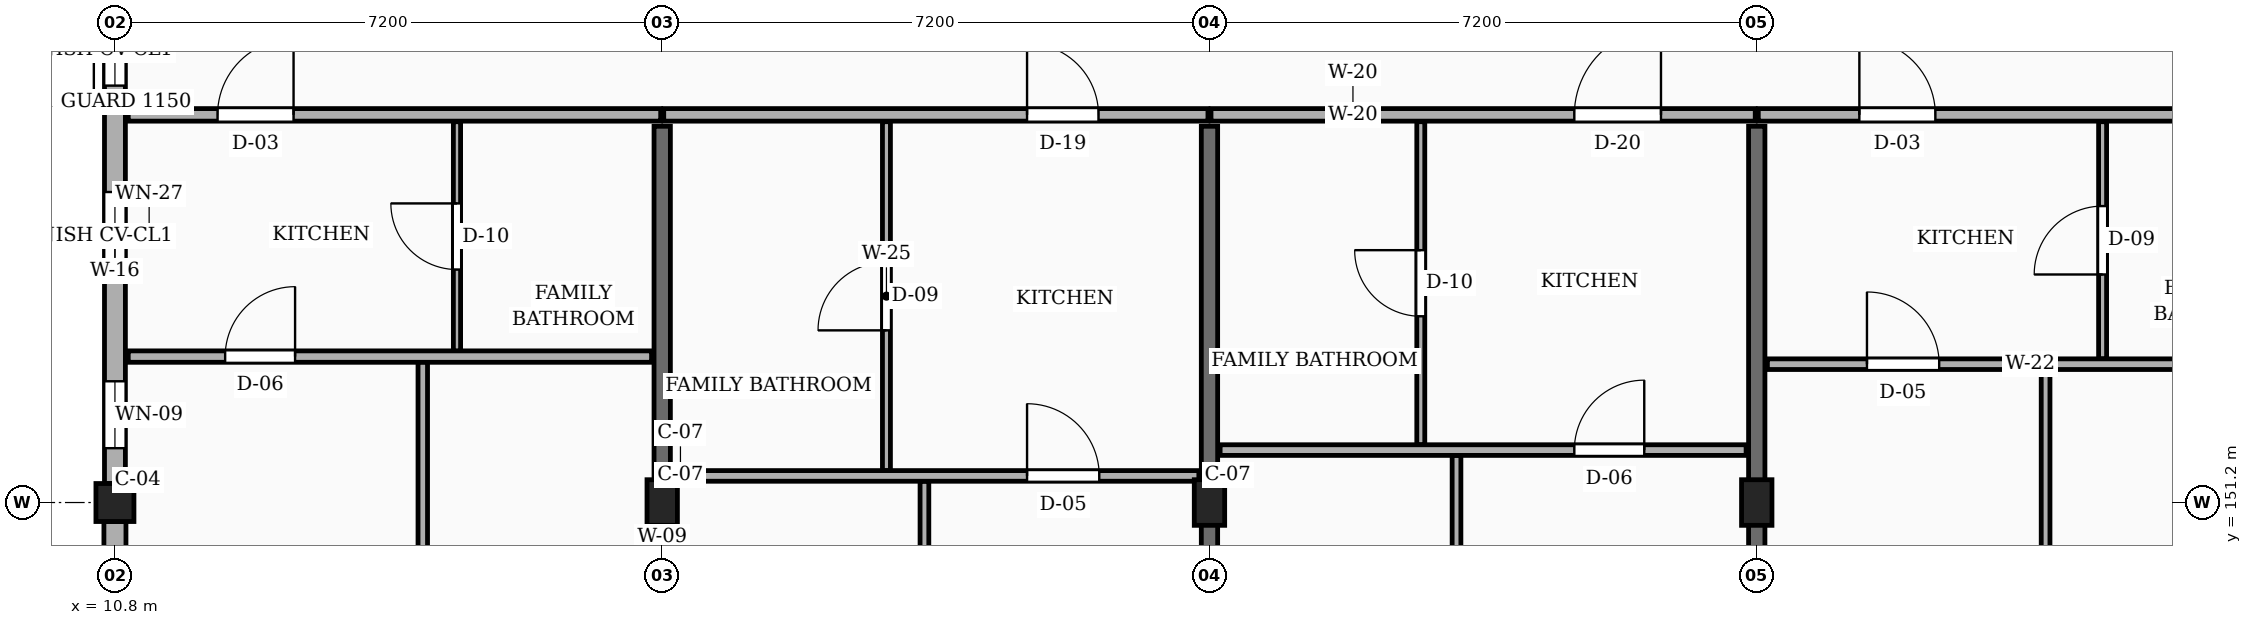
"""IFC4 building model, lengths in metres.
Left out: names, types, materials, properties, quantities, classifications, styles, units other than length and angle.
Written with IfcOpenShell. Run it as: python <this file> out.ifc"""

import sys

from ifc_helpers import new_model, si_unit, direction, frame, frame_2d, origin, origin_2d, place, context, subcontext, project, spatial, rectangle, extrude, element, fill, save


model = new_model("IFC4")
c1 = context("Model", 3, precision=1e-05, world=origin(), true_north=direction((0.0, 1.0)))
c2 = subcontext(c1, "Body", "Model", "MODEL_VIEW")
j1 = project(units=[si_unit("LENGTHUNIT", "METRE"), si_unit("PLANEANGLEUNIT", "RADIAN")], contexts=[c1])
p1 = place(None, origin())
s1 = spatial("IfcSite", under=j1, at=p1, CompositionType="ELEMENT")
p2 = place(p1, origin())
s2 = spatial("IfcBuilding", under=s1, at=p2, CompositionType="ELEMENT")
p3 = place(p2, frame((0.0, 0.0, 32.85)))
s3 = spatial("IfcBuildingStorey", under=s2, at=p3, CompositionType="ELEMENT", Elevation=32.85)
p4 = place(p3, frame((10.8, 151.2, 0.0), z_axis=(0.0, 0.0, 1.0), x_axis=(1.0, 0.0, 0.0)))
e1 = element("IfcColumn", 1, at=p4, inside=s3, PredefinedType="COLUMN", context=c2, shape_type="SweptSolid", body=[
    extrude(rectangle(XDim=0.5, YDim=0.5, at=origin_2d()), origin(), (0.0, 0.0, 1.0), 3.15),
])
for number, where, z_axis, x_axis in (
    (2, (18.0, 151.2, 0.0), (0.0, 0.0, 1.0), (1.0, 0.0, 0.0)),
    (3, (25.2, 151.2, 0.0), (0.0, 0.0, 1.0), (1.0, 0.0, 0.0)),
    (4, (32.4, 151.2, 0.0), (0.0, 0.0, 1.0), (1.0, 0.0, 0.0)),
):
    element("IfcColumn", number, at=place(p3, frame(where, z_axis=z_axis, x_axis=x_axis)), inside=s3, PredefinedType="COLUMN", context=c2, shape_type="SweptSolid", body=[
        extrude(rectangle(XDim=0.4, YDim=0.6, at=origin_2d()), origin(), (0.0, 0.0, 1.0), 3.15),
    ])
for number, where, z_axis, x_axis in (
    (5, (18.0, 144.25, 0.0), (0.0, 0.0, 1.0), (0.0, 1.0, 0.0)),
    (6, (25.2, 144.25, 0.0), (0.0, 0.0, 1.0), (0.0, 1.0, 0.0)),
    (7, (32.4, 144.25, 0.0), (0.0, 0.0, 1.0), (0.0, 1.0, 0.0)),
):
    element("IfcWall", number, at=place(p3, frame(where, z_axis=z_axis, x_axis=x_axis)), inside=s3, PredefinedType="SOLIDWALL", context=c2, shape_type="SweptSolid", body=[
        extrude(rectangle(XDim=11.9, YDim=0.215, at=frame_2d((5.95, 0.0))), origin(), (0.0, 0.0, 1.0), 2.185),
    ])
p5 = place(p3, frame((10.8, 158.15, 0.0), z_axis=(0.0, 0.0, 1.0), x_axis=(0.0, -1.0, 0.0)))
e8 = element("IfcWall", 8, at=p5, inside=s3, PredefinedType="SOLIDWALL", context=c2, shape_type="SweptSolid", body=[
    extrude(rectangle(XDim=6.7, YDim=0.275, at=frame_2d((3.35, 0.0))), origin(), (0.0, 0.0, 1.0), 2.455),
])
p6 = place(p5, frame((0.525, 0.0, 0.78)))
e9 = element("IfcOpeningElement", 9, at=p6, cuts=e8, PredefinedType="OPENING", context=c2, shape_type="SweptSolid", body=[
    extrude(rectangle(XDim=0.94, YDim=1.44, at=frame_2d((0.47, 0.72))), frame((0.0, 0.147, 0.0), z_axis=(0.0, -1.0, 0.0), x_axis=(1.0, 0.0, 0.0)), (0.0, 0.0, 1.0), 0.295),
])
p7 = place(p5, frame((2.865, 0.0, 0.78)))
e10 = element("IfcOpeningElement", 10, at=p7, cuts=e8, PredefinedType="OPENING", context=c2, shape_type="SweptSolid", body=[
    extrude(rectangle(XDim=1.15, YDim=1.44, at=frame_2d((0.575, 0.72))), frame((0.0, 0.147, 0.0), z_axis=(0.0, -1.0, 0.0), x_axis=(1.0, 0.0, 0.0)), (0.0, 0.0, 1.0), 0.295),
])
p8 = place(p5, frame((5.355, 0.0, 0.78)))
e11 = element("IfcOpeningElement", 11, at=p8, cuts=e8, PredefinedType="OPENING", context=c2, shape_type="SweptSolid", body=[
    extrude(rectangle(XDim=0.88, YDim=1.26, at=frame_2d((0.44, 0.63))), frame((0.0, 0.147, 0.0), z_axis=(0.0, -1.0, 0.0), x_axis=(1.0, 0.0, 0.0)), (0.0, 0.0, 1.0), 0.295),
])
p9 = place(p3, frame((10.8, 150.95, 0.0), z_axis=(0.0, 0.0, 1.0), x_axis=(0.0, -1.0, 0.0)))
e12 = element("IfcWall", 12, at=p9, inside=s3, PredefinedType="SOLIDWALL", context=c2, shape_type="SweptSolid", body=[
    extrude(rectangle(XDim=6.7, YDim=0.29, at=frame_2d((3.35, 0.0))), origin(), (0.0, 0.0, 1.0), 2.455),
])
p10 = place(p9, frame((0.45, 0.0, 0.78)))
e13 = element("IfcOpeningElement", 13, at=p10, cuts=e12, PredefinedType="OPENING", context=c2, shape_type="SweptSolid", body=[
    extrude(rectangle(XDim=1.25, YDim=1.44, at=frame_2d((0.625, 0.72))), frame((0.0, 0.155, 0.0), z_axis=(0.0, -1.0, 0.0), x_axis=(1.0, 0.0, 0.0)), (0.0, 0.0, 1.0), 0.31),
])
p11 = place(p9, frame((4.65, 0.0, 0.78)))
e14 = element("IfcOpeningElement", 14, at=p11, cuts=e12, PredefinedType="OPENING", context=c2, shape_type="SweptSolid", body=[
    extrude(rectangle(XDim=1.45, YDim=1.44, at=frame_2d((0.725, 0.72))), frame((0.0, 0.155, 0.0), z_axis=(0.0, -1.0, 0.0), x_axis=(1.0, 0.0, 0.0)), (0.0, 0.0, 1.0), 0.31),
])
p12 = place(p3, frame((10.975, 156.3, 0.0), z_axis=(0.0, 0.0, 1.0), x_axis=(1.0, 0.0, 0.0)))
e15 = element("IfcWall", 15, at=p12, inside=s3, PredefinedType="PARTITIONING", context=c2, shape_type="SweptSolid", body=[
    extrude(rectangle(XDim=7.005, YDim=0.165, at=frame_2d((3.502, 0.0))), origin(), (0.0, 0.0, 1.0), 2.32),
])
p13 = place(p12, frame((1.175, 0.0, 0.0)))
e16 = element("IfcOpeningElement", 16, at=p13, cuts=e15, PredefinedType="OPENING", context=c2, shape_type="SweptSolid", body=[
    extrude(rectangle(XDim=1.0, YDim=2.15, at=frame_2d((0.5, 1.075))), frame((0.0, 0.093, 0.0), z_axis=(0.0, -1.0, 0.0), x_axis=(1.0, 0.0, 0.0)), (0.0, 0.0, 1.0), 0.185),
])
p14 = place(p3, frame((18.02, 156.3, 0.0), z_axis=(0.0, 0.0, 1.0), x_axis=(1.0, 0.0, 0.0)))
e17 = element("IfcWall", 17, at=p14, inside=s3, PredefinedType="PARTITIONING", context=c2, shape_type="SweptSolid", body=[
    extrude(rectangle(XDim=7.16, YDim=0.165, at=frame_2d((3.58, 0.0))), origin(), (0.0, 0.0, 1.0), 2.32),
])
p15 = place(p14, frame((4.78, 0.0, 0.0)))
e18 = element("IfcOpeningElement", 18, at=p15, cuts=e17, PredefinedType="OPENING", context=c2, shape_type="SweptSolid", body=[
    extrude(rectangle(XDim=0.94, YDim=2.12, at=frame_2d((0.47, 1.06))), frame((0.0, 0.093, 0.0), z_axis=(0.0, -1.0, 0.0), x_axis=(1.0, 0.0, 0.0)), (0.0, 0.0, 1.0), 0.185),
])
p16 = place(p3, frame((25.22, 156.3, 0.0), z_axis=(0.0, 0.0, 1.0), x_axis=(1.0, 0.0, 0.0)))
e19 = element("IfcWall", 19, at=p16, inside=s3, PredefinedType="PARTITIONING", context=c2, shape_type="SweptSolid", body=[
    extrude(rectangle(XDim=7.16, YDim=0.165, at=frame_2d((3.58, 0.0))), origin(), (0.0, 0.0, 1.0), 2.32),
])
p17 = place(p16, frame((4.78, 0.0, 0.0)))
e20 = element("IfcOpeningElement", 20, at=p17, cuts=e19, PredefinedType="OPENING", context=c2, shape_type="SweptSolid", body=[
    extrude(rectangle(XDim=1.14, YDim=2.18, at=frame_2d((0.57, 1.09))), frame((0.0, 0.093, 0.0), z_axis=(0.0, -1.0, 0.0), x_axis=(1.0, 0.0, 0.0)), (0.0, 0.0, 1.0), 0.185),
])
p18 = place(p3, frame((32.42, 156.3, 0.0), z_axis=(0.0, 0.0, 1.0), x_axis=(1.0, 0.0, 0.0)))
e21 = element("IfcWall", 21, at=p18, inside=s3, PredefinedType="PARTITIONING", context=c2, shape_type="SweptSolid", body=[
    extrude(rectangle(XDim=7.16, YDim=0.165, at=frame_2d((3.58, 0.0))), origin(), (0.0, 0.0, 1.0), 2.32),
])
p19 = place(p18, frame((1.33, 0.0, 0.0)))
e22 = element("IfcOpeningElement", 22, at=p19, cuts=e21, PredefinedType="OPENING", context=c2, shape_type="SweptSolid", body=[
    extrude(rectangle(XDim=1.0, YDim=2.15, at=frame_2d((0.5, 1.075))), frame((0.0, 0.093, 0.0), z_axis=(0.0, -1.0, 0.0), x_axis=(1.0, 0.0, 0.0)), (0.0, 0.0, 1.0), 0.185),
])
p20 = place(p3, frame((14.85, 144.175, 0.0), z_axis=(0.0, 0.0, 1.0), x_axis=(0.0, 1.0, 0.0)))
e23 = element("IfcWall", 23, at=p20, inside=s3, PredefinedType="PARTITIONING", context=c2, shape_type="SweptSolid", body=[
    extrude(rectangle(XDim=8.875, YDim=0.125, at=frame_2d((4.438, 0.0))), origin(), (0.0, 0.0, 1.0), 2.32),
])
p21 = place(p20, frame((3.998, 0.0, 0.0)))
e24 = element("IfcOpeningElement", 24, at=p21, cuts=e23, PredefinedType="OPENING", context=c2, shape_type="SweptSolid", body=[
    extrude(rectangle(XDim=0.88, YDim=2.08, at=frame_2d((0.44, 1.04))), frame((0.0, 0.073, 0.0), z_axis=(0.0, -1.0, 0.0), x_axis=(1.0, 0.0, 0.0)), (0.0, 0.0, 1.0), 0.145),
])
p22 = place(p3, frame((15.3, 153.19, 0.0), z_axis=(0.0, 0.0, 1.0), x_axis=(0.0, 1.0, 0.0)))
e25 = element("IfcWall", 25, at=p22, inside=s3, PredefinedType="PARTITIONING", context=c2, shape_type="SweptSolid", body=[
    extrude(rectangle(XDim=3.02, YDim=0.095, at=frame_2d((1.51, 0.0))), origin(), (0.0, 0.0, 1.0), 2.32),
])
p23 = place(p22, frame((1.075, 0.0, 0.0)))
e26 = element("IfcOpeningElement", 26, at=p23, cuts=e25, PredefinedType="OPENING", context=c2, shape_type="SweptSolid", body=[
    extrude(rectangle(XDim=0.87, YDim=2.05, at=frame_2d((0.435, 1.025))), frame((0.0, 0.058, 0.0), z_axis=(0.0, -1.0, 0.0), x_axis=(1.0, 0.0, 0.0)), (0.0, 0.0, 1.0), 0.115),
])
p24 = place(p3, frame((10.975, 153.12, 0.0), z_axis=(0.0, 0.0, 1.0), x_axis=(1.0, 0.0, 0.0)))
e27 = element("IfcWall", 27, at=p24, inside=s3, PredefinedType="PARTITIONING", context=c2, shape_type="SweptSolid", body=[
    extrude(rectangle(XDim=6.885, YDim=0.15, at=frame_2d((3.442, 0.0))), origin(), (0.0, 0.0, 1.0), 2.32),
])
p25 = place(p24, frame((1.275, 0.0, 0.0)))
e28 = element("IfcOpeningElement", 28, at=p25, cuts=e27, PredefinedType="OPENING", context=c2, shape_type="SweptSolid", body=[
    extrude(rectangle(XDim=0.92, YDim=2.1, at=frame_2d((0.46, 1.05))), frame((0.0, 0.085, 0.0), z_axis=(0.0, -1.0, 0.0), x_axis=(1.0, 0.0, 0.0)), (0.0, 0.0, 1.0), 0.17),
])
p26 = place(p3, frame((21.45, 144.175, 0.0), z_axis=(0.0, 0.0, 1.0), x_axis=(0.0, 1.0, 0.0)))
e29 = element("IfcWall", 29, at=p26, inside=s3, PredefinedType="PARTITIONING", context=c2, shape_type="SweptSolid", body=[
    extrude(rectangle(XDim=7.305, YDim=0.115, at=frame_2d((3.652, 0.0))), origin(), (0.0, 0.0, 1.0), 2.32),
])
p27 = place(p26, frame((3.202, 0.0, 0.0)))
e30 = element("IfcOpeningElement", 30, at=p27, cuts=e29, PredefinedType="OPENING", context=c2, shape_type="SweptSolid", body=[
    extrude(rectangle(XDim=0.9, YDim=2.1, at=frame_2d((0.45, 1.05))), frame((0.0, 0.067, 0.0), z_axis=(0.0, -1.0, 0.0), x_axis=(1.0, 0.0, 0.0)), (0.0, 0.0, 1.0), 0.135),
])
p28 = place(p3, frame((20.95, 151.62, 0.0), z_axis=(0.0, 0.0, 1.0), x_axis=(0.0, 1.0, 0.0)))
e31 = element("IfcWall", 31, at=p28, inside=s3, PredefinedType="PARTITIONING", context=c2, shape_type="SweptSolid", body=[
    extrude(rectangle(XDim=4.59, YDim=0.105, at=frame_2d((2.295, 0.0))), origin(), (0.0, 0.0, 1.0), 2.32),
])
p29 = place(p28, frame((1.845, 0.0, 0.0)))
e32 = element("IfcOpeningElement", 32, at=p29, cuts=e31, PredefinedType="OPENING", context=c2, shape_type="SweptSolid", body=[
    extrude(rectangle(XDim=0.9, YDim=2.05, at=frame_2d((0.45, 1.025))), frame((0.0, 0.062, 0.0), z_axis=(0.0, -1.0, 0.0), x_axis=(1.0, 0.0, 0.0)), (0.0, 0.0, 1.0), 0.125),
])
p30 = place(p3, frame((18.14, 151.55, 0.0), z_axis=(0.0, 0.0, 1.0), x_axis=(1.0, 0.0, 0.0)))
e33 = element("IfcWall", 33, at=p30, inside=s3, PredefinedType="PARTITIONING", context=c2, shape_type="SweptSolid", body=[
    extrude(rectangle(XDim=6.92, YDim=0.14, at=frame_2d((3.46, 0.0))), origin(), (0.0, 0.0, 1.0), 2.32),
])
p31 = place(p30, frame((4.66, 0.0, 0.0)))
e34 = element("IfcOpeningElement", 34, at=p31, cuts=e33, PredefinedType="OPENING", context=c2, shape_type="SweptSolid", body=[
    extrude(rectangle(XDim=0.95, YDim=2.1, at=frame_2d((0.475, 1.05))), frame((0.0, 0.08, 0.0), z_axis=(0.0, -1.0, 0.0), x_axis=(1.0, 0.0, 0.0)), (0.0, 0.0, 1.0), 0.16),
])
p32 = place(p3, frame((28.45, 144.175, 0.0), z_axis=(0.0, 0.0, 1.0), x_axis=(0.0, 1.0, 0.0)))
e35 = element("IfcWall", 35, at=p32, inside=s3, PredefinedType="PARTITIONING", context=c2, shape_type="SweptSolid", body=[
    extrude(rectangle(XDim=7.645, YDim=0.115, at=frame_2d((3.823, 0.0))), origin(), (0.0, 0.0, 1.0), 2.32),
])
p33 = place(p32, frame((3.383, 0.0, 0.0)))
e36 = element("IfcOpeningElement", 36, at=p33, cuts=e35, PredefinedType="OPENING", context=c2, shape_type="SweptSolid", body=[
    extrude(rectangle(XDim=0.88, YDim=2.08, at=frame_2d((0.44, 1.04))), frame((0.0, 0.067, 0.0), z_axis=(0.0, -1.0, 0.0), x_axis=(1.0, 0.0, 0.0)), (0.0, 0.0, 1.0), 0.135),
])
p34 = place(p3, frame((27.98, 151.96, 0.0), z_axis=(0.0, 0.0, 1.0), x_axis=(0.0, 1.0, 0.0)))
e37 = element("IfcWall", 37, at=p34, inside=s3, PredefinedType="PARTITIONING", context=c2, shape_type="SweptSolid", body=[
    extrude(rectangle(XDim=4.25, YDim=0.105, at=frame_2d((2.125, 0.0))), origin(), (0.0, 0.0, 1.0), 2.32),
])
p35 = place(p34, frame((1.69, 0.0, 0.0)))
e38 = element("IfcOpeningElement", 38, at=p35, cuts=e37, PredefinedType="OPENING", context=c2, shape_type="SweptSolid", body=[
    extrude(rectangle(XDim=0.87, YDim=2.05, at=frame_2d((0.435, 1.025))), frame((0.0, 0.062, 0.0), z_axis=(0.0, -1.0, 0.0), x_axis=(1.0, 0.0, 0.0)), (0.0, 0.0, 1.0), 0.125),
])
p36 = place(p3, frame((25.34, 151.89, 0.0), z_axis=(0.0, 0.0, 1.0), x_axis=(1.0, 0.0, 0.0)))
e39 = element("IfcWall", 39, at=p36, inside=s3, PredefinedType="PARTITIONING", context=c2, shape_type="SweptSolid", body=[
    extrude(rectangle(XDim=6.92, YDim=0.14, at=frame_2d((3.46, 0.0))), origin(), (0.0, 0.0, 1.0), 2.32),
])
p37 = place(p36, frame((4.66, 0.0, 0.0)))
e40 = element("IfcOpeningElement", 40, at=p37, cuts=e39, PredefinedType="OPENING", context=c2, shape_type="SweptSolid", body=[
    extrude(rectangle(XDim=0.92, YDim=2.1, at=frame_2d((0.46, 1.05))), frame((0.0, 0.08, 0.0), z_axis=(0.0, -1.0, 0.0), x_axis=(1.0, 0.0, 0.0)), (0.0, 0.0, 1.0), 0.16),
])
p38 = place(p3, frame((36.2, 144.175, 0.0), z_axis=(0.0, 0.0, 1.0), x_axis=(0.0, 1.0, 0.0)))
e41 = element("IfcWall", 41, at=p38, inside=s3, PredefinedType="PARTITIONING", context=c2, shape_type="SweptSolid", body=[
    extrude(rectangle(XDim=8.775, YDim=0.115, at=frame_2d((4.387, 0.0))), origin(), (0.0, 0.0, 1.0), 2.32),
])
p39 = place(p38, frame((3.938, 0.0, 0.0)))
e42 = element("IfcOpeningElement", 42, at=p39, cuts=e41, PredefinedType="OPENING", context=c2, shape_type="SweptSolid", body=[
    extrude(rectangle(XDim=0.9, YDim=2.1, at=frame_2d((0.45, 1.05))), frame((0.0, 0.067, 0.0), z_axis=(0.0, -1.0, 0.0), x_axis=(1.0, 0.0, 0.0)), (0.0, 0.0, 1.0), 0.135),
])
p40 = place(p3, frame((36.95, 153.09, 0.0), z_axis=(0.0, 0.0, 1.0), x_axis=(0.0, 1.0, 0.0)))
e43 = element("IfcWall", 43, at=p40, inside=s3, PredefinedType="PARTITIONING", context=c2, shape_type="SweptSolid", body=[
    extrude(rectangle(XDim=3.12, YDim=0.105, at=frame_2d((1.56, 0.0))), origin(), (0.0, 0.0, 1.0), 2.32),
])
p41 = place(p40, frame((1.11, 0.0, 0.0)))
e44 = element("IfcOpeningElement", 44, at=p41, cuts=e43, PredefinedType="OPENING", context=c2, shape_type="SweptSolid", body=[
    extrude(rectangle(XDim=0.9, YDim=2.05, at=frame_2d((0.45, 1.025))), frame((0.0, 0.062, 0.0), z_axis=(0.0, -1.0, 0.0), x_axis=(1.0, 0.0, 0.0)), (0.0, 0.0, 1.0), 0.125),
])
p42 = place(p3, frame((32.54, 153.02, 0.0), z_axis=(0.0, 0.0, 1.0), x_axis=(1.0, 0.0, 0.0)))
e45 = element("IfcWall", 45, at=p42, inside=s3, PredefinedType="PARTITIONING", context=c2, shape_type="SweptSolid", body=[
    extrude(rectangle(XDim=6.92, YDim=0.14, at=frame_2d((3.46, 0.0))), origin(), (0.0, 0.0, 1.0), 2.32),
])
p43 = place(p42, frame((1.31, 0.0, 0.0)))
e46 = element("IfcOpeningElement", 46, at=p43, cuts=e45, PredefinedType="OPENING", context=c2, shape_type="SweptSolid", body=[
    extrude(rectangle(XDim=0.95, YDim=2.1, at=frame_2d((0.475, 1.05))), frame((0.0, 0.08, 0.0), z_axis=(0.0, -1.0, 0.0), x_axis=(1.0, 0.0, 0.0)), (0.0, 0.0, 1.0), 0.16),
])
p44 = place(p6, origin())
e47 = element("IfcWindow", 47, at=p44, inside=s3, PartitioningType="SINGLE_PANEL", PredefinedType="WINDOW", context=c2, shape_type="SweptSolid", body=[
    extrude(rectangle(XDim=0.94, YDim=1.44, at=frame_2d((0.47, 0.72))), frame((0.0, 0.03, 0.0), z_axis=(0.0, -1.0, 0.0), x_axis=(1.0, 0.0, 0.0)), (0.0, 0.0, 1.0), 0.06),
])
fill(e9, e47)
p45 = place(p7, origin())
e48 = element("IfcWindow", 48, at=p45, inside=s3, PartitioningType="SINGLE_PANEL", PredefinedType="WINDOW", context=c2, shape_type="SweptSolid", body=[
    extrude(rectangle(XDim=1.15, YDim=1.44, at=frame_2d((0.575, 0.72))), frame((0.0, 0.03, 0.0), z_axis=(0.0, -1.0, 0.0), x_axis=(1.0, 0.0, 0.0)), (0.0, 0.0, 1.0), 0.06),
])
fill(e10, e48)
p46 = place(p8, origin())
e49 = element("IfcWindow", 49, at=p46, inside=s3, PartitioningType="SINGLE_PANEL", PredefinedType="WINDOW", context=c2, shape_type="SweptSolid", body=[
    extrude(rectangle(XDim=0.88, YDim=1.26, at=frame_2d((0.44, 0.63))), frame((0.0, 0.03, 0.0), z_axis=(0.0, -1.0, 0.0), x_axis=(1.0, 0.0, 0.0)), (0.0, 0.0, 1.0), 0.06),
])
fill(e11, e49)
p47 = place(p13, origin())
e50 = element("IfcDoor", 50, at=p47, inside=s3, OperationType="SINGLE_SWING_RIGHT", PredefinedType="DOOR", context=c2, shape_type="SweptSolid", body=[
    extrude(rectangle(XDim=1.0, YDim=2.15, at=frame_2d((0.5, 1.075))), frame((0.0, 0.025, 0.0), z_axis=(0.0, -1.0, 0.0), x_axis=(1.0, 0.0, 0.0)), (0.0, 0.0, 1.0), 0.05),
])
fill(e16, e50)
p48 = place(p15, origin())
e51 = element("IfcDoor", 51, at=p48, inside=s3, OperationType="SINGLE_SWING_LEFT", PredefinedType="DOOR", context=c2, shape_type="SweptSolid", body=[
    extrude(rectangle(XDim=0.94, YDim=2.12, at=frame_2d((0.47, 1.06))), frame((0.0, 0.025, 0.0), z_axis=(0.0, -1.0, 0.0), x_axis=(1.0, 0.0, 0.0)), (0.0, 0.0, 1.0), 0.05),
])
fill(e18, e51)
p49 = place(p17, origin())
e52 = element("IfcDoor", 52, at=p49, inside=s3, OperationType="SINGLE_SWING_RIGHT", PredefinedType="DOOR", context=c2, shape_type="SweptSolid", body=[
    extrude(rectangle(XDim=1.14, YDim=2.18, at=frame_2d((0.57, 1.09))), frame((0.0, 0.025, 0.0), z_axis=(0.0, -1.0, 0.0), x_axis=(1.0, 0.0, 0.0)), (0.0, 0.0, 1.0), 0.05),
])
fill(e20, e52)
p50 = place(p19, origin())
e53 = element("IfcDoor", 53, at=p50, inside=s3, OperationType="SINGLE_SWING_LEFT", PredefinedType="DOOR", context=c2, shape_type="SweptSolid", body=[
    extrude(rectangle(XDim=1.0, YDim=2.15, at=frame_2d((0.5, 1.075))), frame((0.0, 0.025, 0.0), z_axis=(0.0, -1.0, 0.0), x_axis=(1.0, 0.0, 0.0)), (0.0, 0.0, 1.0), 0.05),
])
fill(e22, e53)
p51 = place(p23, origin())
e54 = element("IfcDoor", 54, at=p51, inside=s3, OperationType="SINGLE_SWING_RIGHT", PredefinedType="DOOR", context=c2, shape_type="SweptSolid", body=[
    extrude(rectangle(XDim=0.87, YDim=2.05, at=frame_2d((0.435, 1.025))), frame((0.0, 0.025, 0.0), z_axis=(0.0, -1.0, 0.0), x_axis=(1.0, 0.0, 0.0)), (0.0, 0.0, 1.0), 0.05),
])
fill(e26, e54)
p52 = place(p25, origin())
e55 = element("IfcDoor", 55, at=p52, inside=s3, OperationType="SINGLE_SWING_RIGHT", PredefinedType="DOOR", context=c2, shape_type="SweptSolid", body=[
    extrude(rectangle(XDim=0.92, YDim=2.1, at=frame_2d((0.46, 1.05))), frame((0.0, 0.025, 0.0), z_axis=(0.0, -1.0, 0.0), x_axis=(1.0, 0.0, 0.0)), (0.0, 0.0, 1.0), 0.05),
])
fill(e28, e55)
p53 = place(p29, origin())
e56 = element("IfcDoor", 56, at=p53, inside=s3, OperationType="SINGLE_SWING_LEFT", PredefinedType="DOOR", context=c2, shape_type="SweptSolid", body=[
    extrude(rectangle(XDim=0.9, YDim=2.05, at=frame_2d((0.45, 1.025))), frame((0.0, 0.025, 0.0), z_axis=(0.0, -1.0, 0.0), x_axis=(1.0, 0.0, 0.0)), (0.0, 0.0, 1.0), 0.05),
])
fill(e32, e56)
p54 = place(p31, origin())
e57 = element("IfcDoor", 57, at=p54, inside=s3, OperationType="SINGLE_SWING_LEFT", PredefinedType="DOOR", context=c2, shape_type="SweptSolid", body=[
    extrude(rectangle(XDim=0.95, YDim=2.1, at=frame_2d((0.475, 1.05))), frame((0.0, 0.025, 0.0), z_axis=(0.0, -1.0, 0.0), x_axis=(1.0, 0.0, 0.0)), (0.0, 0.0, 1.0), 0.05),
])
fill(e34, e57)
p55 = place(p35, origin())
e58 = element("IfcDoor", 58, at=p55, inside=s3, OperationType="SINGLE_SWING_RIGHT", PredefinedType="DOOR", context=c2, shape_type="SweptSolid", body=[
    extrude(rectangle(XDim=0.87, YDim=2.05, at=frame_2d((0.435, 1.025))), frame((0.0, 0.025, 0.0), z_axis=(0.0, -1.0, 0.0), x_axis=(1.0, 0.0, 0.0)), (0.0, 0.0, 1.0), 0.05),
])
fill(e38, e58)
p56 = place(p37, origin())
e59 = element("IfcDoor", 59, at=p56, inside=s3, OperationType="SINGLE_SWING_RIGHT", PredefinedType="DOOR", context=c2, shape_type="SweptSolid", body=[
    extrude(rectangle(XDim=0.92, YDim=2.1, at=frame_2d((0.46, 1.05))), frame((0.0, 0.025, 0.0), z_axis=(0.0, -1.0, 0.0), x_axis=(1.0, 0.0, 0.0)), (0.0, 0.0, 1.0), 0.05),
])
fill(e40, e59)
p57 = place(p41, origin())
e60 = element("IfcDoor", 60, at=p57, inside=s3, OperationType="SINGLE_SWING_LEFT", PredefinedType="DOOR", context=c2, shape_type="SweptSolid", body=[
    extrude(rectangle(XDim=0.9, YDim=2.05, at=frame_2d((0.45, 1.025))), frame((0.0, 0.025, 0.0), z_axis=(0.0, -1.0, 0.0), x_axis=(1.0, 0.0, 0.0)), (0.0, 0.0, 1.0), 0.05),
])
fill(e44, e60)
p58 = place(p43, origin())
e61 = element("IfcDoor", 61, at=p58, inside=s3, OperationType="SINGLE_SWING_LEFT", PredefinedType="DOOR", context=c2, shape_type="SweptSolid", body=[
    extrude(rectangle(XDim=0.95, YDim=2.1, at=frame_2d((0.475, 1.05))), frame((0.0, 0.025, 0.0), z_axis=(0.0, -1.0, 0.0), x_axis=(1.0, 0.0, 0.0)), (0.0, 0.0, 1.0), 0.05),
])
fill(e46, e61)
save(model, sys.argv[1])
